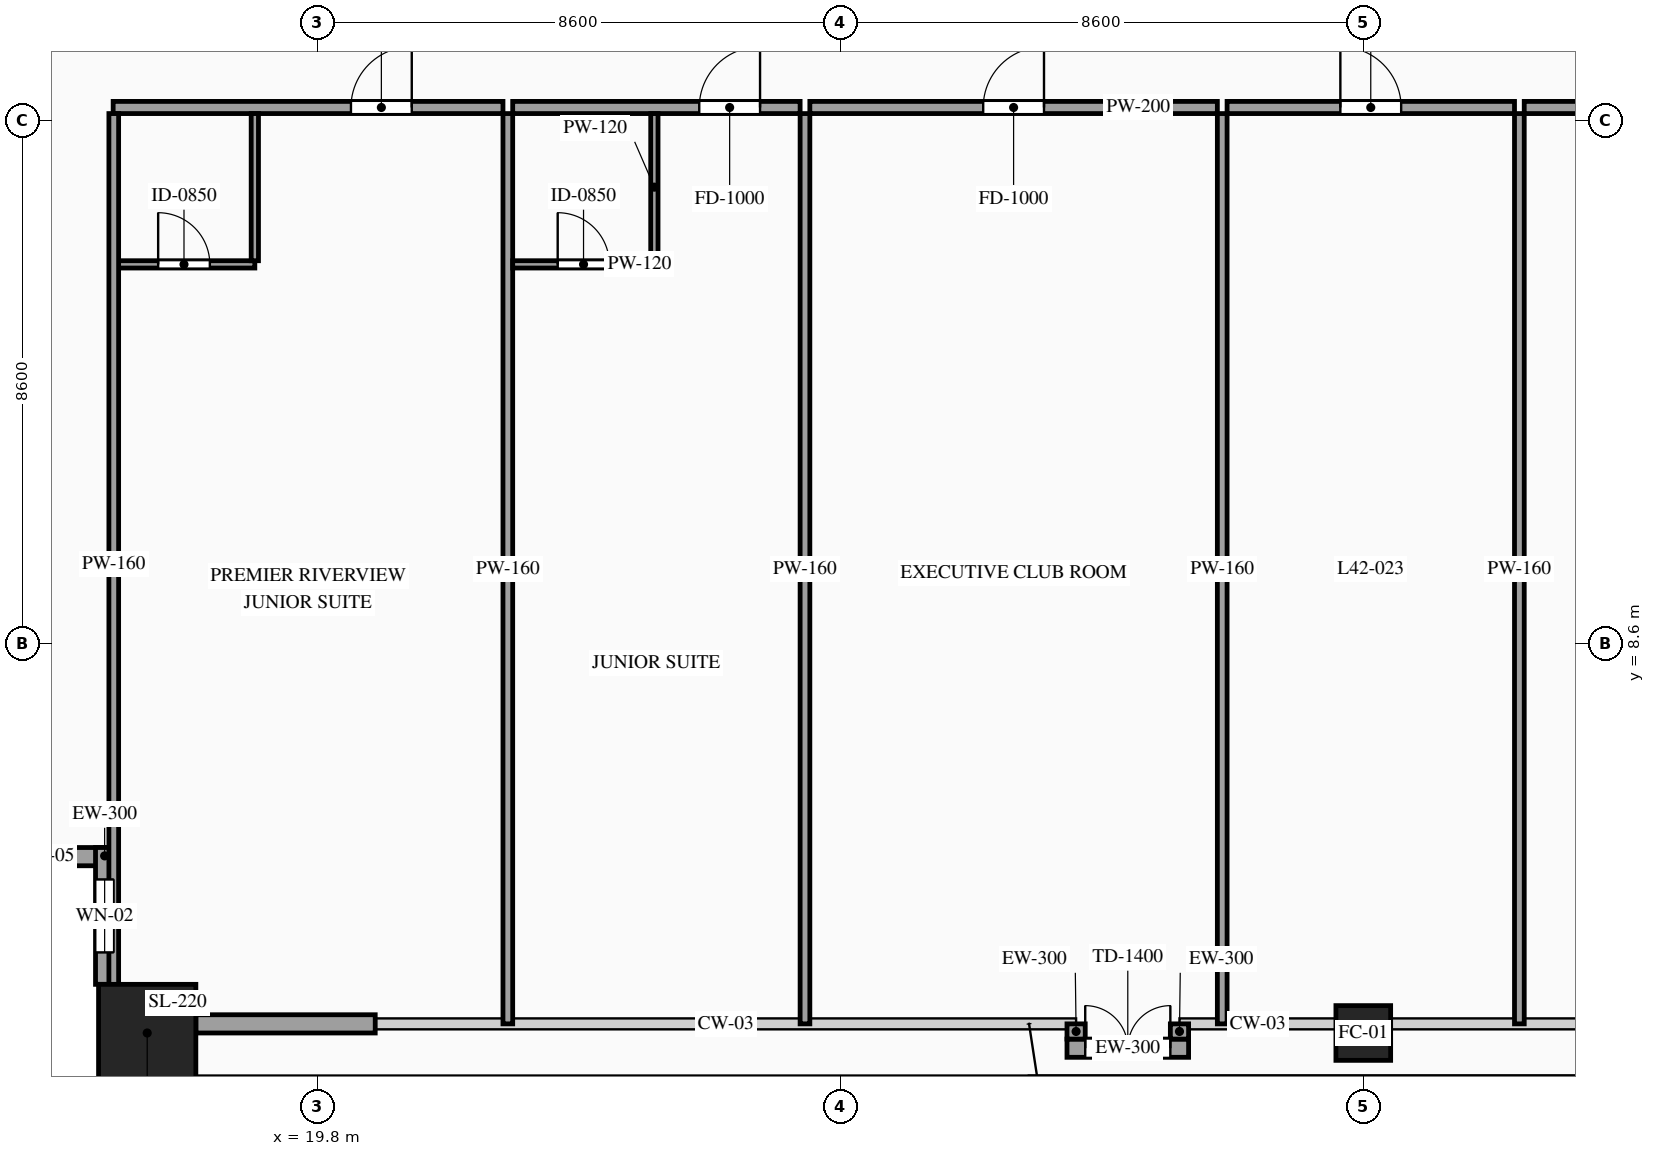
"""IFC4 building model, lengths in metres.
Left out: names, types, materials, properties, quantities, classifications, styles, units other than length and angle.
Written with IfcOpenShell. Run it as: python <this file> out.ifc"""

import sys

from ifc_helpers import new_model, si_unit, direction, frame, frame_2d, origin, origin_2d, place, context, subcontext, project, spatial, rectangle, hollow_rectangle, extrude, source, transform, mapped, element, fill, save


model = new_model("IFC4")
c1 = context("Model", 3, precision=1e-05, world=origin(), true_north=direction((0.0, 1.0)))
c2 = subcontext(c1, "Body", "Model", "MODEL_VIEW")
j1 = project(units=[si_unit("LENGTHUNIT", "METRE"), si_unit("PLANEANGLEUNIT", "RADIAN")], contexts=[c1])
p1 = place(None, origin())
s1 = spatial("IfcSite", under=j1, at=p1, CompositionType="ELEMENT")
p2 = place(p1, origin())
s2 = spatial("IfcBuilding", under=s1, at=p2, CompositionType="ELEMENT")
p3 = place(p2, frame((0.0, 0.0, 159.6)))
s3 = spatial("IfcBuildingStorey", under=s2, at=p3, CompositionType="ELEMENT", Elevation=159.6)
m1 = source(origin(), c2, "Body", "SweptSolid", [
    extrude(hollow_rectangle(XDim=1.6, YDim=1.6, WallThickness=0.07, at=origin_2d()), origin(), (0.0, 0.0, 1.0), 3.6),
])
p4 = place(p3, frame((17.0, 2.2, 0.0), z_axis=(0.0, 0.0, 1.0), x_axis=(1.0, 0.0, 0.0)))
e1 = element("IfcColumn", 1, at=p4, inside=s3, PredefinedType="COLUMN", context=c2, shape_type="MappedRepresentation", body=[
    mapped(m1, transform((0.0, 0.0, 0.0), scale=1.0)),
])
m2 = source(origin(), c2, "Body", "SweptSolid", [
    extrude(hollow_rectangle(XDim=0.9, YDim=0.9, WallThickness=0.042, at=origin_2d()), origin(), (0.0, 0.0, 1.0), 3.6),
])
p5 = place(p3, frame((37.0, 2.2, 0.0), z_axis=(0.0, 0.0, 1.0), x_axis=(1.0, 0.0, 0.0)))
e2 = element("IfcColumn", 2, at=p5, inside=s3, PredefinedType="COLUMN", context=c2, shape_type="MappedRepresentation", body=[
    mapped(m2, transform((0.0, 0.0, 0.0), scale=1.0)),
])
p6 = place(p3, frame((14.2, 5.1, 0.0), z_axis=(0.0, 0.0, 1.0), x_axis=(1.0, 0.0, 0.0)))
e3 = element("IfcWall", 3, at=p6, inside=s3, PredefinedType="SOLIDWALL", context=c2, shape_type="SweptSolid", body=[
    extrude(rectangle(XDim=2.25, YDim=0.3, at=frame_2d((1.125, 0.0))), origin(), (0.0, 0.0, 1.0), 3.38),
])
p7 = place(p6, frame((0.675, 0.0, 0.85)))
e4 = element("IfcOpeningElement", 4, at=p7, cuts=e3, PredefinedType="OPENING", context=c2, shape_type="SweptSolid", body=[
    extrude(rectangle(XDim=0.9, YDim=1.5, at=frame_2d((0.45, 0.75))), frame((0.0, 0.165, 0.0), z_axis=(0.0, -1.0, 0.0), x_axis=(1.0, 0.0, 0.0)), (0.0, 0.0, 1.0), 0.33),
])
p8 = place(p3, frame((16.3, 5.25, 0.0), z_axis=(0.0, 0.0, 1.0), x_axis=(0.0, -1.0, 0.0)))
e5 = element("IfcWall", 5, at=p8, inside=s3, PredefinedType="SOLIDWALL", context=c2, shape_type="SweptSolid", body=[
    extrude(rectangle(XDim=2.25, YDim=0.3, at=frame_2d((1.125, 0.0))), origin(), (0.0, 0.0, 1.0), 3.38),
])
p9 = place(p8, frame((0.525, 0.0, 0.85)))
e6 = element("IfcOpeningElement", 6, at=p9, cuts=e5, PredefinedType="OPENING", context=c2, shape_type="SweptSolid", body=[
    extrude(rectangle(XDim=1.2, YDim=2.1, at=frame_2d((0.6, 1.05))), frame((0.0, 0.165, 0.0), z_axis=(0.0, -1.0, 0.0), x_axis=(1.0, 0.0, 0.0)), (0.0, 0.0, 1.0), 0.33),
])
m3 = source(origin(), c2, "Body", "SweptSolid", [
    extrude(rectangle(XDim=2.95, YDim=0.3, at=frame_2d((1.475, 0.0))), origin(), (0.0, 0.0, 1.0), 2.775),
])
p10 = place(p3, frame((17.8, 2.35, 0.0), z_axis=(0.0, 0.0, 1.0), x_axis=(1.0, 0.0, 0.0)))
e7 = element("IfcWall", 7, at=p10, inside=s3, PredefinedType="SOLIDWALL", context=c2, shape_type="MappedRepresentation", body=[
    mapped(m3, transform((0.0, 0.0, 0.0), scale=1.0)),
])
p11 = place(p3, frame((32.127, 1.95, 0.0), z_axis=(0.0, 0.0, 1.0), x_axis=(1.0, 0.0, 0.0)))
e8 = element("IfcWall", 8, at=p11, inside=s3, PredefinedType="SOLIDWALL", context=c2, shape_type="SweptSolid", body=[
    extrude(rectangle(XDim=2.0, YDim=0.3, at=frame_2d((1.0, 0.0))), origin(), (0.0, 0.0, 1.0), 3.38),
])
p12 = place(p11, frame((0.3, 0.0, 0.0)))
e9 = element("IfcOpeningElement", 9, at=p12, cuts=e8, PredefinedType="OPENING", context=c2, shape_type="SweptSolid", body=[
    extrude(rectangle(XDim=1.4, YDim=2.3, at=frame_2d((0.7, 1.15))), frame((0.0, 0.165, 0.0), z_axis=(0.0, -1.0, 0.0), x_axis=(1.0, 0.0, 0.0)), (0.0, 0.0, 1.0), 0.33),
])
m4 = source(origin(), c2, "Body", "SweptSolid", [
    extrude(rectangle(XDim=0.25, YDim=0.3, at=frame_2d((0.125, 0.0))), origin(), (0.0, 0.0, 1.0), 3.38),
])
for number, where, z_axis, x_axis in (
    (10, (32.277, 2.35, 0.0), (0.0, 0.0, 1.0), (0.0, -1.0, 0.0)),
    (11, (33.977, 2.1, 0.0), (0.0, 0.0, 1.0), (0.0, 1.0, 0.0)),
):
    element("IfcWall", number, at=place(p3, frame(where, z_axis=z_axis, x_axis=x_axis)), inside=s3, PredefinedType="SOLIDWALL", context=c2, shape_type="MappedRepresentation", body=[
        mapped(m4, transform((0.0, 0.0, 0.0), scale=1.0)),
    ])
p13 = place(p3, frame((16.44, 17.42, 0.0), z_axis=(0.0, 0.0, 1.0), x_axis=(1.0, 0.0, 0.0)))
e12 = element("IfcWall", 12, at=p13, inside=s3, PredefinedType="PARTITIONING", context=c2, shape_type="SweptSolid", body=[
    extrude(rectangle(XDim=6.411, YDim=0.2, at=frame_2d((3.206, 0.0))), origin(), (0.0, 0.0, 1.0), 3.38),
])
p14 = place(p13, frame((3.911, 0.0, 0.0)))
e13 = element("IfcOpeningElement", 13, at=p14, cuts=e12, PredefinedType="OPENING", context=c2, shape_type="SweptSolid", body=[
    extrude(rectangle(XDim=1.0, YDim=2.2, at=frame_2d((0.5, 1.1))), frame((0.0, 0.115, 0.0), z_axis=(0.0, -1.0, 0.0), x_axis=(1.0, 0.0, 0.0)), (0.0, 0.0, 1.0), 0.23),
])
m5 = source(origin(), c2, "Body", "SweptSolid", [
    extrude(rectangle(XDim=14.97, YDim=0.16, at=frame_2d((7.485, 0.0))), origin(), (0.0, 0.0, 1.0), 3.38),
])
p15 = place(p3, frame((22.931, 2.35, 0.0), z_axis=(0.0, 0.0, 1.0), x_axis=(0.0, 1.0, 0.0)))
e14 = element("IfcWall", 14, at=p15, inside=s3, PredefinedType="PARTITIONING", context=c2, shape_type="MappedRepresentation", body=[
    mapped(m5, transform((0.0, 0.0, 0.0), scale=1.0)),
])
p16 = place(p3, frame((16.44, 14.84, 0.0), z_axis=(0.0, 0.0, 1.0), x_axis=(1.0, 0.0, 0.0)))
e15 = element("IfcWall", 15, at=p16, inside=s3, PredefinedType="PARTITIONING", context=c2, shape_type="SweptSolid", body=[
    extrude(rectangle(XDim=2.33, YDim=0.12, at=frame_2d((1.165, 0.0))), origin(), (0.0, 0.0, 1.0), 3.38),
])
p17 = place(p16, frame((0.74, 0.0, 0.0)))
e16 = element("IfcOpeningElement", 16, at=p17, cuts=e15, PredefinedType="OPENING", context=c2, shape_type="SweptSolid", body=[
    extrude(rectangle(XDim=0.85, YDim=2.1, at=frame_2d((0.425, 1.05))), frame((0.0, 0.075, 0.0), z_axis=(0.0, -1.0, 0.0), x_axis=(1.0, 0.0, 0.0)), (0.0, 0.0, 1.0), 0.15),
])
m6 = source(origin(), c2, "Body", "SweptSolid", [
    extrude(rectangle(XDim=2.42, YDim=0.12, at=frame_2d((1.21, 0.0))), origin(), (0.0, 0.0, 1.0), 3.38),
])
p18 = place(p3, frame((18.77, 14.9, 0.0), z_axis=(0.0, 0.0, 1.0), x_axis=(0.0, 1.0, 0.0)))
e17 = element("IfcWall", 17, at=p18, inside=s3, PredefinedType="PARTITIONING", context=c2, shape_type="MappedRepresentation", body=[
    mapped(m6, transform((0.0, 0.0, 0.0), scale=1.0)),
])
p19 = place(p3, frame((23.011, 17.42, 0.0), z_axis=(0.0, 0.0, 1.0), x_axis=(1.0, 0.0, 0.0)))
e18 = element("IfcWall", 18, at=p19, inside=s3, PredefinedType="PARTITIONING", context=c2, shape_type="SweptSolid", body=[
    extrude(rectangle(XDim=4.727, YDim=0.2, at=frame_2d((2.364, 0.0))), origin(), (0.0, 0.0, 1.0), 3.38),
])
p20 = place(p19, frame((3.068, 0.0, 0.0)))
e19 = element("IfcOpeningElement", 19, at=p20, cuts=e18, PredefinedType="OPENING", context=c2, shape_type="SweptSolid", body=[
    extrude(rectangle(XDim=1.0, YDim=2.2, at=frame_2d((0.5, 1.1))), frame((0.0, 0.115, 0.0), z_axis=(0.0, -1.0, 0.0), x_axis=(1.0, 0.0, 0.0)), (0.0, 0.0, 1.0), 0.23),
])
p21 = place(p3, frame((27.818, 2.35, 0.0), z_axis=(0.0, 0.0, 1.0), x_axis=(0.0, 1.0, 0.0)))
e20 = element("IfcWall", 20, at=p21, inside=s3, PredefinedType="PARTITIONING", context=c2, shape_type="MappedRepresentation", body=[
    mapped(m5, transform((0.0, 0.0, 0.0), scale=1.0)),
])
p22 = place(p3, frame((23.011, 14.84, 0.0), z_axis=(0.0, 0.0, 1.0), x_axis=(1.0, 0.0, 0.0)))
e21 = element("IfcWall", 21, at=p22, inside=s3, PredefinedType="PARTITIONING", context=c2, shape_type="SweptSolid", body=[
    extrude(rectangle(XDim=2.33, YDim=0.12, at=frame_2d((1.165, 0.0))), origin(), (0.0, 0.0, 1.0), 3.38),
])
p23 = place(p22, frame((0.74, 0.0, 0.0)))
e22 = element("IfcOpeningElement", 22, at=p23, cuts=e21, PredefinedType="OPENING", context=c2, shape_type="SweptSolid", body=[
    extrude(rectangle(XDim=0.85, YDim=2.1, at=frame_2d((0.425, 1.05))), frame((0.0, 0.075, 0.0), z_axis=(0.0, -1.0, 0.0), x_axis=(1.0, 0.0, 0.0)), (0.0, 0.0, 1.0), 0.15),
])
p24 = place(p3, frame((25.341, 14.9, 0.0), z_axis=(0.0, 0.0, 1.0), x_axis=(0.0, 1.0, 0.0)))
e23 = element("IfcWall", 23, at=p24, inside=s3, PredefinedType="PARTITIONING", context=c2, shape_type="MappedRepresentation", body=[
    mapped(m6, transform((0.0, 0.0, 0.0), scale=1.0)),
])
p25 = place(p3, frame((27.898, 17.42, 0.0), z_axis=(0.0, 0.0, 1.0), x_axis=(1.0, 0.0, 0.0)))
e24 = element("IfcWall", 24, at=p25, inside=s3, PredefinedType="PARTITIONING", context=c2, shape_type="SweptSolid", body=[
    extrude(rectangle(XDim=6.702, YDim=0.2, at=frame_2d((3.351, 0.0))), origin(), (0.0, 0.0, 1.0), 3.38),
])
p26 = place(p25, frame((2.851, 0.0, 0.0)))
e25 = element("IfcOpeningElement", 25, at=p26, cuts=e24, PredefinedType="OPENING", context=c2, shape_type="SweptSolid", body=[
    extrude(rectangle(XDim=1.0, YDim=2.2, at=frame_2d((0.5, 1.1))), frame((0.0, 0.115, 0.0), z_axis=(0.0, -1.0, 0.0), x_axis=(1.0, 0.0, 0.0)), (0.0, 0.0, 1.0), 0.23),
])
p27 = place(p3, frame((34.68, 2.35, 0.0), z_axis=(0.0, 0.0, 1.0), x_axis=(0.0, 1.0, 0.0)))
e26 = element("IfcWall", 26, at=p27, inside=s3, PredefinedType="PARTITIONING", context=c2, shape_type="MappedRepresentation", body=[
    mapped(m5, transform((0.0, 0.0, 0.0), scale=1.0)),
])
p28 = place(p3, frame((34.76, 17.42, 0.0), z_axis=(0.0, 0.0, 1.0), x_axis=(1.0, 0.0, 0.0)))
e27 = element("IfcWall", 27, at=p28, inside=s3, PredefinedType="PARTITIONING", context=c2, shape_type="SweptSolid", body=[
    extrude(rectangle(XDim=4.727, YDim=0.2, at=frame_2d((2.364, 0.0))), origin(), (0.0, 0.0, 1.0), 3.38),
])
p29 = place(p28, frame((1.863, 0.0, 0.0)))
e28 = element("IfcOpeningElement", 28, at=p29, cuts=e27, PredefinedType="OPENING", context=c2, shape_type="SweptSolid", body=[
    extrude(rectangle(XDim=1.0, YDim=2.2, at=frame_2d((0.5, 1.1))), frame((0.0, 0.115, 0.0), z_axis=(0.0, -1.0, 0.0), x_axis=(1.0, 0.0, 0.0)), (0.0, 0.0, 1.0), 0.23),
])
p30 = place(p3, frame((39.567, 2.35, 0.0), z_axis=(0.0, 0.0, 1.0), x_axis=(0.0, 1.0, 0.0)))
e29 = element("IfcWall", 29, at=p30, inside=s3, PredefinedType="PARTITIONING", context=c2, shape_type="MappedRepresentation", body=[
    mapped(m5, transform((0.0, 0.0, 0.0), scale=1.0)),
])
p31 = place(p3, frame((39.647, 17.42, 0.0), z_axis=(0.0, 0.0, 1.0), x_axis=(1.0, 0.0, 0.0)))
e30 = element("IfcWall", 30, at=p31, inside=s3, PredefinedType="PARTITIONING", context=c2, shape_type="SweptSolid", body=[
    extrude(rectangle(XDim=6.701, YDim=0.2, at=frame_2d((3.351, 0.0))), origin(), (0.0, 0.0, 1.0), 3.38),
])
p32 = place(p31, frame((2.851, 0.0, 0.0)))
e31 = element("IfcOpeningElement", 31, at=p32, cuts=e30, PredefinedType="OPENING", context=c2, shape_type="SweptSolid", body=[
    extrude(rectangle(XDim=1.0, YDim=2.2, at=frame_2d((0.5, 1.1))), frame((0.0, 0.115, 0.0), z_axis=(0.0, -1.0, 0.0), x_axis=(1.0, 0.0, 0.0)), (0.0, 0.0, 1.0), 0.23),
])
m7 = source(origin(), c2, "Body", "SweptSolid", [
    extrude(rectangle(XDim=14.82, YDim=0.16, at=frame_2d((7.41, 0.0))), origin(), (0.0, 0.0, 1.0), 3.38),
])
p33 = place(p3, frame((16.45, 2.5, 0.0), z_axis=(0.0, 0.0, 1.0), x_axis=(0.0, 1.0, 0.0)))
e32 = element("IfcWall", 32, at=p33, inside=s3, PredefinedType="PARTITIONING", context=c2, shape_type="MappedRepresentation", body=[
    mapped(m7, transform((0.0, 0.0, 0.0), scale=1.0)),
])
m8 = source(origin(), c2, "Body", "SweptSolid", [
    extrude(rectangle(XDim=0.9, YDim=1.5, at=frame_2d((0.45, 0.75))), frame((0.0, 0.03, 0.0), z_axis=(0.0, -1.0, 0.0), x_axis=(1.0, 0.0, 0.0)), (0.0, 0.0, 1.0), 0.06),
])
p34 = place(p7, origin())
e33 = element("IfcWindow", 33, at=p34, inside=s3, PartitioningType="SINGLE_PANEL", PredefinedType="WINDOW", context=c2, shape_type="MappedRepresentation", body=[
    mapped(m8, transform((0.0, 0.0, 0.0), scale=1.0)),
])
fill(e4, e33)
m9 = source(origin(), c2, "Body", "SweptSolid", [
    extrude(rectangle(XDim=1.2, YDim=2.1, at=frame_2d((0.6, 1.05))), frame((0.0, 0.03, 0.0), z_axis=(0.0, -1.0, 0.0), x_axis=(1.0, 0.0, 0.0)), (0.0, 0.0, 1.0), 0.06),
])
p35 = place(p9, origin())
e34 = element("IfcWindow", 34, at=p35, inside=s3, PartitioningType="SINGLE_PANEL", PredefinedType="WINDOW", context=c2, shape_type="MappedRepresentation", body=[
    mapped(m9, transform((0.0, 0.0, 0.0), scale=1.0)),
])
fill(e6, e34)
m10 = source(origin(), c2, "Body", "SweptSolid", [
    extrude(rectangle(XDim=1.4, YDim=2.3, at=frame_2d((0.7, 1.15))), frame((0.0, 0.025, 0.0), z_axis=(0.0, -1.0, 0.0), x_axis=(1.0, 0.0, 0.0)), (0.0, 0.0, 1.0), 0.05),
])
p36 = place(p12, origin())
e35 = element("IfcDoor", 35, at=p36, inside=s3, OperationType="DOUBLE_DOOR_SINGLE_SWING", PredefinedType="DOOR", context=c2, shape_type="MappedRepresentation", body=[
    mapped(m10, transform((0.0, 0.0, 0.0), scale=1.0)),
])
fill(e9, e35)
m11 = source(origin(), c2, "Body", "SweptSolid", [
    extrude(rectangle(XDim=1.0, YDim=2.2, at=frame_2d((0.5, 1.1))), frame((0.0, 0.025, 0.0), z_axis=(0.0, -1.0, 0.0), x_axis=(1.0, 0.0, 0.0)), (0.0, 0.0, 1.0), 0.05),
])
p37 = place(p14, origin())
e36 = element("IfcDoor", 36, at=p37, inside=s3, OperationType="SINGLE_SWING_RIGHT", PredefinedType="DOOR", context=c2, shape_type="MappedRepresentation", body=[
    mapped(m11, transform((0.0, 0.0, 0.0), scale=1.0)),
])
fill(e13, e36)
m12 = source(origin(), c2, "Body", "SweptSolid", [
    extrude(rectangle(XDim=0.85, YDim=2.1, at=frame_2d((0.425, 1.05))), frame((0.0, 0.025, 0.0), z_axis=(0.0, -1.0, 0.0), x_axis=(1.0, 0.0, 0.0)), (0.0, 0.0, 1.0), 0.05),
])
p38 = place(p17, origin())
e37 = element("IfcDoor", 37, at=p38, inside=s3, OperationType="SINGLE_SWING_LEFT", PredefinedType="DOOR", context=c2, shape_type="MappedRepresentation", body=[
    mapped(m12, transform((0.0, 0.0, 0.0), scale=1.0)),
])
fill(e16, e37)
p39 = place(p20, origin())
e38 = element("IfcDoor", 38, at=p39, inside=s3, OperationType="SINGLE_SWING_RIGHT", PredefinedType="DOOR", context=c2, shape_type="MappedRepresentation", body=[
    mapped(m11, transform((0.0, 0.0, 0.0), scale=1.0)),
])
fill(e19, e38)
p40 = place(p23, origin())
e39 = element("IfcDoor", 39, at=p40, inside=s3, OperationType="SINGLE_SWING_LEFT", PredefinedType="DOOR", context=c2, shape_type="MappedRepresentation", body=[
    mapped(m12, transform((0.0, 0.0, 0.0), scale=1.0)),
])
fill(e22, e39)
p41 = place(p26, origin())
e40 = element("IfcDoor", 40, at=p41, inside=s3, OperationType="SINGLE_SWING_RIGHT", PredefinedType="DOOR", context=c2, shape_type="MappedRepresentation", body=[
    mapped(m11, transform((0.0, 0.0, 0.0), scale=1.0)),
])
fill(e25, e40)
p42 = place(p29, origin())
e41 = element("IfcDoor", 41, at=p42, inside=s3, OperationType="SINGLE_SWING_LEFT", PredefinedType="DOOR", context=c2, shape_type="MappedRepresentation", body=[
    mapped(m11, transform((0.0, 0.0, 0.0), scale=1.0)),
])
fill(e28, e41)
save(model, sys.argv[1])
